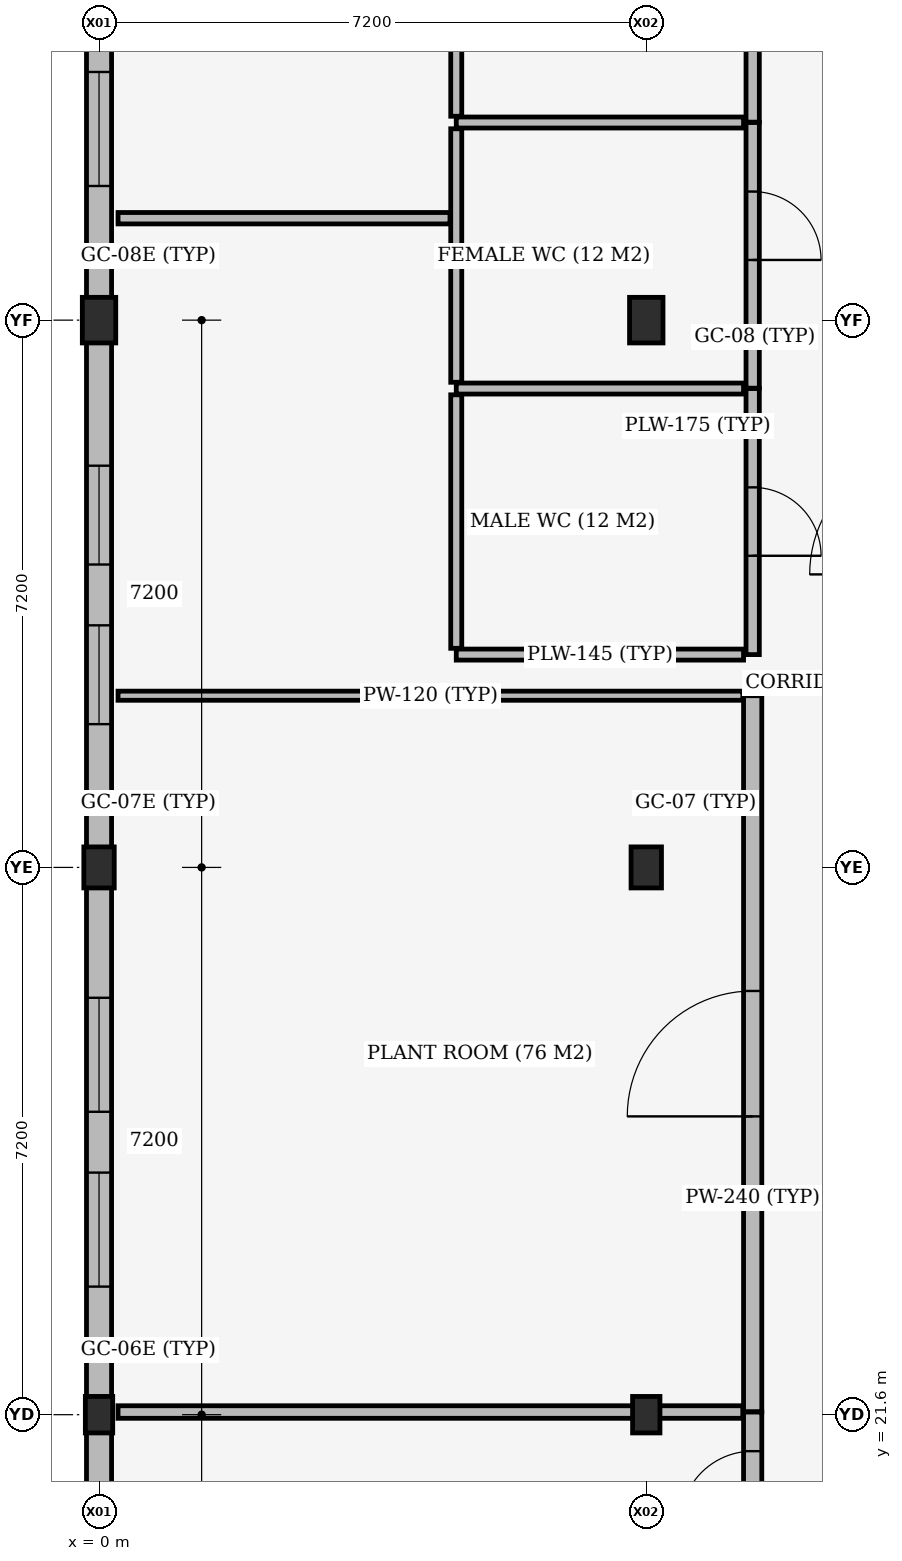
"""IFC4 building model, lengths in metres.
Left out: names, types, materials, properties, quantities, classifications, styles, units other than length and angle.
Written with IfcOpenShell. Run it as: python <this file> out.ifc"""

import sys

from ifc_helpers import new_model, si_unit, direction, frame, frame_2d, origin, origin_2d, place, context, subcontext, project, spatial, rectangle, extrude, element, fill, save


model = new_model("IFC4")
c1 = context("Model", 3, precision=1e-05, world=origin(), true_north=direction((0.0, 1.0)))
c2 = subcontext(c1, "Body", "Model", "MODEL_VIEW")
j1 = project(units=[si_unit("LENGTHUNIT", "METRE"), si_unit("PLANEANGLEUNIT", "RADIAN")], contexts=[c1])
p1 = place(None, origin())
s1 = spatial("IfcSite", under=j1, at=p1, CompositionType="ELEMENT")
p2 = place(p1, origin())
s2 = spatial("IfcBuilding", under=s1, at=p2, CompositionType="ELEMENT")
p3 = place(p2, frame((0.0, 0.0, 22.2)))
s3 = spatial("IfcBuildingStorey", under=s2, at=p3, CompositionType="ELEMENT", Elevation=22.2)
p4 = place(p3, frame((0.0, 21.6, 0.0), z_axis=(0.0, 0.0, 1.0), x_axis=(1.0, 0.0, 0.0)))
e1 = element("IfcColumn", 1, at=p4, inside=s3, PredefinedType="COLUMN", context=c2, shape_type="SweptSolid", body=[
    extrude(rectangle(XDim=0.36, YDim=0.48, at=origin_2d()), origin(), (0.0, 0.0, 1.0), 3.96),
])
p5 = place(p3, frame((0.0, 28.8, 0.0), z_axis=(0.0, 0.0, 1.0), x_axis=(1.0, 0.0, 0.0)))
e2 = element("IfcColumn", 2, at=p5, inside=s3, PredefinedType="COLUMN", context=c2, shape_type="SweptSolid", body=[
    extrude(rectangle(XDim=0.4, YDim=0.54, at=origin_2d()), origin(), (0.0, 0.0, 1.0), 3.96),
])
p6 = place(p3, frame((0.0, 36.0, 0.0), z_axis=(0.0, 0.0, 1.0), x_axis=(1.0, 0.0, 0.0)))
e3 = element("IfcColumn", 3, at=p6, inside=s3, PredefinedType="COLUMN", context=c2, shape_type="SweptSolid", body=[
    extrude(rectangle(XDim=0.44, YDim=0.6, at=origin_2d()), origin(), (0.0, 0.0, 1.0), 3.96),
])
p7 = place(p3, frame((7.2, 21.6, 0.0), z_axis=(0.0, 0.0, 1.0), x_axis=(1.0, 0.0, 0.0)))
e4 = element("IfcColumn", 4, at=p7, inside=s3, PredefinedType="COLUMN", context=c2, shape_type="SweptSolid", body=[
    extrude(rectangle(XDim=0.36, YDim=0.48, at=origin_2d()), origin(), (0.0, 0.0, 1.0), 3.96),
])
p8 = place(p3, frame((7.2, 28.8, 0.0), z_axis=(0.0, 0.0, 1.0), x_axis=(1.0, 0.0, 0.0)))
e5 = element("IfcColumn", 5, at=p8, inside=s3, PredefinedType="COLUMN", context=c2, shape_type="SweptSolid", body=[
    extrude(rectangle(XDim=0.4, YDim=0.54, at=origin_2d()), origin(), (0.0, 0.0, 1.0), 3.96),
])
p9 = place(p3, frame((7.2, 36.0, 0.0), z_axis=(0.0, 0.0, 1.0), x_axis=(1.0, 0.0, 0.0)))
e6 = element("IfcColumn", 6, at=p9, inside=s3, PredefinedType="COLUMN", context=c2, shape_type="SweptSolid", body=[
    extrude(rectangle(XDim=0.44, YDim=0.6, at=origin_2d()), origin(), (0.0, 0.0, 1.0), 3.96),
])
p10 = place(p3, frame((0.0, 14.642, 0.0), z_axis=(0.0, 0.0, 1.0), x_axis=(0.0, 1.0, 0.0)))
e7 = element("IfcWall", 7, at=p10, inside=s3, PredefinedType="STANDARD", context=c2, shape_type="SweptSolid", body=[
    extrude(rectangle(XDim=6.726, YDim=0.33, at=frame_2d((3.363, 0.0))), origin(), (0.0, 0.0, 1.0), 3.96),
])
p11 = place(p10, frame((1.663, 0.0, 0.95)))
e8 = element("IfcOpeningElement", 8, at=p11, cuts=e7, PredefinedType="OPENING", context=c2, shape_type="SweptSolid", body=[
    extrude(rectangle(XDim=1.3, YDim=1.8, at=frame_2d((0.65, 0.9))), frame((0.0, 0.175, 0.0), z_axis=(0.0, -1.0, 0.0), x_axis=(1.0, 0.0, 0.0)), (0.0, 0.0, 1.0), 0.35),
])
p12 = place(p10, frame((3.763, 0.0, 0.95)))
e9 = element("IfcOpeningElement", 9, at=p12, cuts=e7, PredefinedType="OPENING", context=c2, shape_type="SweptSolid", body=[
    extrude(rectangle(XDim=1.3, YDim=1.8, at=frame_2d((0.65, 0.9))), frame((0.0, 0.175, 0.0), z_axis=(0.0, -1.0, 0.0), x_axis=(1.0, 0.0, 0.0)), (0.0, 0.0, 1.0), 0.35),
])
p13 = place(p3, frame((0.0, 21.832, 0.0), z_axis=(0.0, 0.0, 1.0), x_axis=(0.0, 1.0, 0.0)))
e10 = element("IfcWall", 10, at=p13, inside=s3, PredefinedType="STANDARD", context=c2, shape_type="SweptSolid", body=[
    extrude(rectangle(XDim=6.706, YDim=0.33, at=frame_2d((3.353, 0.0))), origin(), (0.0, 0.0, 1.0), 3.96),
])
p14 = place(p13, frame((1.453, 0.0, 0.95)))
e11 = element("IfcOpeningElement", 11, at=p14, cuts=e10, PredefinedType="OPENING", context=c2, shape_type="SweptSolid", body=[
    extrude(rectangle(XDim=1.5, YDim=1.8, at=frame_2d((0.75, 0.9))), frame((0.0, 0.175, 0.0), z_axis=(0.0, -1.0, 0.0), x_axis=(1.0, 0.0, 0.0)), (0.0, 0.0, 1.0), 0.35),
])
p15 = place(p13, frame((3.753, 0.0, 0.95)))
e12 = element("IfcOpeningElement", 12, at=p15, cuts=e10, PredefinedType="OPENING", context=c2, shape_type="SweptSolid", body=[
    extrude(rectangle(XDim=1.5, YDim=1.8, at=frame_2d((0.75, 0.9))), frame((0.0, 0.175, 0.0), z_axis=(0.0, -1.0, 0.0), x_axis=(1.0, 0.0, 0.0)), (0.0, 0.0, 1.0), 0.35),
])
p16 = place(p3, frame((0.0, 29.062, 0.0), z_axis=(0.0, 0.0, 1.0), x_axis=(0.0, 1.0, 0.0)))
e13 = element("IfcWall", 13, at=p16, inside=s3, PredefinedType="STANDARD", context=c2, shape_type="SweptSolid", body=[
    extrude(rectangle(XDim=6.646, YDim=0.33, at=frame_2d((3.323, 0.0))), origin(), (0.0, 0.0, 1.0), 3.96),
])
p17 = place(p16, frame((1.623, 0.0, 0.95)))
e14 = element("IfcOpeningElement", 14, at=p17, cuts=e13, PredefinedType="OPENING", context=c2, shape_type="SweptSolid", body=[
    extrude(rectangle(XDim=1.3, YDim=1.8, at=frame_2d((0.65, 0.9))), frame((0.0, 0.175, 0.0), z_axis=(0.0, -1.0, 0.0), x_axis=(1.0, 0.0, 0.0)), (0.0, 0.0, 1.0), 0.35),
])
p18 = place(p16, frame((3.723, 0.0, 0.95)))
e15 = element("IfcOpeningElement", 15, at=p18, cuts=e13, PredefinedType="OPENING", context=c2, shape_type="SweptSolid", body=[
    extrude(rectangle(XDim=1.3, YDim=1.8, at=frame_2d((0.65, 0.9))), frame((0.0, 0.175, 0.0), z_axis=(0.0, -1.0, 0.0), x_axis=(1.0, 0.0, 0.0)), (0.0, 0.0, 1.0), 0.35),
])
p19 = place(p3, frame((0.0, 36.292, 0.0), z_axis=(0.0, 0.0, 1.0), x_axis=(0.0, 1.0, 0.0)))
e16 = element("IfcWall", 16, at=p19, inside=s3, PredefinedType="STANDARD", context=c2, shape_type="SweptSolid", body=[
    extrude(rectangle(XDim=6.746, YDim=0.33, at=frame_2d((3.373, 0.0))), origin(), (0.0, 0.0, 1.0), 3.96),
])
p20 = place(p19, frame((1.473, 0.0, 0.95)))
e17 = element("IfcOpeningElement", 17, at=p20, cuts=e16, PredefinedType="OPENING", context=c2, shape_type="SweptSolid", body=[
    extrude(rectangle(XDim=1.5, YDim=1.8, at=frame_2d((0.75, 0.9))), frame((0.0, 0.175, 0.0), z_axis=(0.0, -1.0, 0.0), x_axis=(1.0, 0.0, 0.0)), (0.0, 0.0, 1.0), 0.35),
])
p21 = place(p19, frame((3.773, 0.0, 0.95)))
e18 = element("IfcOpeningElement", 18, at=p21, cuts=e16, PredefinedType="OPENING", context=c2, shape_type="SweptSolid", body=[
    extrude(rectangle(XDim=1.5, YDim=1.8, at=frame_2d((0.75, 0.9))), frame((0.0, 0.175, 0.0), z_axis=(0.0, -1.0, 0.0), x_axis=(1.0, 0.0, 0.0)), (0.0, 0.0, 1.0), 0.35),
])
p22 = place(p3, frame((8.6, 31.6, 0.0), z_axis=(0.0, 0.0, 1.0), x_axis=(0.0, 1.0, 0.0)))
e19 = element("IfcWall", 19, at=p22, inside=s3, PredefinedType="PLUMBINGWALL", context=c2, shape_type="SweptSolid", body=[
    extrude(rectangle(XDim=3.5, YDim=0.175, at=frame_2d((1.75, 0.0))), origin(), (0.0, 0.0, 1.0), 3.96),
])
p23 = place(p22, frame((1.3, 0.0, 0.0)))
e20 = element("IfcOpeningElement", 20, at=p23, cuts=e19, PredefinedType="OPENING", context=c2, shape_type="SweptSolid", body=[
    extrude(rectangle(XDim=0.9, YDim=2.1, at=frame_2d((0.45, 1.05))), frame((0.0, 0.097, 0.0), z_axis=(0.0, -1.0, 0.0), x_axis=(1.0, 0.0, 0.0)), (0.0, 0.0, 1.0), 0.195),
])
for number, where, z_axis, x_axis in (
    (21, (4.7, 31.6, 0.0), (0.0, 0.0, 1.0), (1.0, 0.0, 0.0)),
    (22, (4.7, 35.1, 0.0), (0.0, 0.0, 1.0), (1.0, 0.0, 0.0)),
):
    element("IfcWall", number, at=place(p3, frame(where, z_axis=z_axis, x_axis=x_axis)), inside=s3, PredefinedType="PLUMBINGWALL", context=c2, shape_type="SweptSolid", body=[
        extrude(rectangle(XDim=3.78, YDim=0.145, at=frame_2d((1.89, 0.0))), origin(), (0.0, 0.0, 1.0), 3.96),
    ])
p24 = place(p3, frame((4.7, 31.683, 0.0), z_axis=(0.0, 0.0, 1.0), x_axis=(0.0, 1.0, 0.0)))
e23 = element("IfcWall", 23, at=p24, inside=s3, PredefinedType="PLUMBINGWALL", context=c2, shape_type="SweptSolid", body=[
    extrude(rectangle(XDim=3.335, YDim=0.145, at=frame_2d((1.667, 0.0))), origin(), (0.0, 0.0, 1.0), 3.96),
])
p25 = place(p3, frame((8.6, 35.105, 0.0), z_axis=(0.0, 0.0, 1.0), x_axis=(0.0, 1.0, 0.0)))
e24 = element("IfcWall", 24, at=p25, inside=s3, PredefinedType="PLUMBINGWALL", context=c2, shape_type="SweptSolid", body=[
    extrude(rectangle(XDim=3.495, YDim=0.175, at=frame_2d((1.748, 0.0))), origin(), (0.0, 0.0, 1.0), 3.96),
])
p26 = place(p25, frame((1.687, 0.0, 0.0)))
e25 = element("IfcOpeningElement", 25, at=p26, cuts=e24, PredefinedType="OPENING", context=c2, shape_type="SweptSolid", body=[
    extrude(rectangle(XDim=0.9, YDim=2.1, at=frame_2d((0.45, 1.05))), frame((0.0, 0.097, 0.0), z_axis=(0.0, -1.0, 0.0), x_axis=(1.0, 0.0, 0.0)), (0.0, 0.0, 1.0), 0.195),
])
p27 = place(p3, frame((4.7, 38.6, 0.0), z_axis=(0.0, 0.0, 1.0), x_axis=(1.0, 0.0, 0.0)))
e26 = element("IfcWall", 26, at=p27, inside=s3, PredefinedType="PLUMBINGWALL", context=c2, shape_type="SweptSolid", body=[
    extrude(rectangle(XDim=3.78, YDim=0.145, at=frame_2d((1.89, 0.0))), origin(), (0.0, 0.0, 1.0), 3.96),
])
p28 = place(p3, frame((4.7, 35.183, 0.0), z_axis=(0.0, 0.0, 1.0), x_axis=(0.0, 1.0, 0.0)))
e27 = element("IfcWall", 27, at=p28, inside=s3, PredefinedType="PLUMBINGWALL", context=c2, shape_type="SweptSolid", body=[
    extrude(rectangle(XDim=3.335, YDim=0.145, at=frame_2d((1.667, 0.0))), origin(), (0.0, 0.0, 1.0), 3.96),
])
p29 = place(p3, frame((8.6, 38.605, 0.0), z_axis=(0.0, 0.0, 1.0), x_axis=(0.0, 1.0, 0.0)))
e28 = element("IfcWall", 28, at=p29, inside=s3, PredefinedType="PLUMBINGWALL", context=c2, shape_type="SweptSolid", body=[
    extrude(rectangle(XDim=2.995, YDim=0.175, at=frame_2d((1.498, 0.0))), origin(), (0.0, 0.0, 1.0), 3.96),
])
p30 = place(p29, frame((1.038, 0.0, 0.0)))
e29 = element("IfcOpeningElement", 29, at=p30, cuts=e28, PredefinedType="OPENING", context=c2, shape_type="SweptSolid", body=[
    extrude(rectangle(XDim=0.92, YDim=2.1, at=frame_2d((0.46, 1.05))), frame((0.0, 0.097, 0.0), z_axis=(0.0, -1.0, 0.0), x_axis=(1.0, 0.0, 0.0)), (0.0, 0.0, 1.0), 0.195),
])
p31 = place(p3, frame((4.7, 38.683, 0.0), z_axis=(0.0, 0.0, 1.0), x_axis=(0.0, 1.0, 0.0)))
e30 = element("IfcWall", 30, at=p31, inside=s3, PredefinedType="PLUMBINGWALL", context=c2, shape_type="SweptSolid", body=[
    extrude(rectangle(XDim=2.835, YDim=0.145, at=frame_2d((1.417, 0.0))), origin(), (0.0, 0.0, 1.0), 3.96),
])
p32 = place(p3, frame((8.6, 19.655, 0.0), z_axis=(0.0, 0.0, 1.0), x_axis=(0.0, 1.0, 0.0)))
e31 = element("IfcWall", 31, at=p32, inside=s3, PredefinedType="STANDARD", context=c2, shape_type="SweptSolid", body=[
    extrude(rectangle(XDim=1.98, YDim=0.24, at=frame_2d((0.99, 0.0))), origin(), (0.0, 0.0, 1.0), 3.96),
])
p33 = place(p32, frame((0.515, 0.0, 0.0)))
e32 = element("IfcOpeningElement", 32, at=p33, cuts=e31, PredefinedType="OPENING", context=c2, shape_type="SweptSolid", body=[
    extrude(rectangle(XDim=0.95, YDim=2.15, at=frame_2d((0.475, 1.075))), frame((0.0, 0.13, 0.0), z_axis=(0.0, -1.0, 0.0), x_axis=(1.0, 0.0, 0.0)), (0.0, 0.0, 1.0), 0.26),
])
p34 = place(p3, frame((0.25, 21.635, 0.0), z_axis=(0.0, 0.0, 1.0), x_axis=(1.0, 0.0, 0.0)))
e33 = element("IfcWall", 33, at=p34, inside=s3, PredefinedType="PARTITIONING", context=c2, shape_type="SweptSolid", body=[
    extrude(rectangle(XDim=8.22, YDim=0.165, at=frame_2d((4.11, 0.0))), origin(), (0.0, 0.0, 1.0), 3.96),
])
p35 = place(p3, frame((8.6, 21.64, 0.0), z_axis=(0.0, 0.0, 1.0), x_axis=(0.0, 1.0, 0.0)))
e34 = element("IfcWall", 34, at=p35, inside=s3, PredefinedType="STANDARD", context=c2, shape_type="SweptSolid", body=[
    extrude(rectangle(XDim=9.419, YDim=0.24, at=frame_2d((4.709, 0.0))), origin(), (0.0, 0.0, 1.0), 3.96),
])
p36 = place(p35, frame((3.885, 0.0, 0.0)))
e35 = element("IfcOpeningElement", 35, at=p36, cuts=e34, PredefinedType="OPENING", context=c2, shape_type="SweptSolid", body=[
    extrude(rectangle(XDim=1.65, YDim=2.25, at=frame_2d((0.825, 1.125))), frame((0.0, 0.13, 0.0), z_axis=(0.0, -1.0, 0.0), x_axis=(1.0, 0.0, 0.0)), (0.0, 0.0, 1.0), 0.26),
])
p37 = place(p3, frame((0.25, 31.059, 0.0), z_axis=(0.0, 0.0, 1.0), x_axis=(1.0, 0.0, 0.0)))
e36 = element("IfcWall", 36, at=p37, inside=s3, PredefinedType="PARTITIONING", context=c2, shape_type="SweptSolid", body=[
    extrude(rectangle(XDim=8.22, YDim=0.12, at=frame_2d((4.11, 0.0))), origin(), (0.0, 0.0, 1.0), 3.96),
])
p38 = place(p3, frame((0.25, 37.341, 0.0), z_axis=(0.0, 0.0, 1.0), x_axis=(1.0, 0.0, 0.0)))
e37 = element("IfcWall", 37, at=p38, inside=s3, PredefinedType="PARTITIONING", context=c2, shape_type="SweptSolid", body=[
    extrude(rectangle(XDim=4.367, YDim=0.15, at=frame_2d((2.184, 0.0))), origin(), (0.0, 0.0, 1.0), 3.96),
])
p39 = place(p14, origin())
e38 = element("IfcWindow", 38, at=p39, inside=s3, PartitioningType="DOUBLE_PANEL_VERTICAL", PredefinedType="WINDOW", context=c2, shape_type="SweptSolid", body=[
    extrude(rectangle(XDim=1.5, YDim=1.8, at=frame_2d((0.75, 0.9))), frame((0.0, 0.03, 0.0), z_axis=(0.0, -1.0, 0.0), x_axis=(1.0, 0.0, 0.0)), (0.0, 0.0, 1.0), 0.06),
])
fill(e11, e38)
p40 = place(p15, origin())
e39 = element("IfcWindow", 39, at=p40, inside=s3, PartitioningType="DOUBLE_PANEL_VERTICAL", PredefinedType="WINDOW", context=c2, shape_type="SweptSolid", body=[
    extrude(rectangle(XDim=1.5, YDim=1.8, at=frame_2d((0.75, 0.9))), frame((0.0, 0.03, 0.0), z_axis=(0.0, -1.0, 0.0), x_axis=(1.0, 0.0, 0.0)), (0.0, 0.0, 1.0), 0.06),
])
fill(e12, e39)
p41 = place(p17, origin())
e40 = element("IfcWindow", 40, at=p41, inside=s3, PartitioningType="DOUBLE_PANEL_VERTICAL", PredefinedType="WINDOW", context=c2, shape_type="SweptSolid", body=[
    extrude(rectangle(XDim=1.3, YDim=1.8, at=frame_2d((0.65, 0.9))), frame((0.0, 0.03, 0.0), z_axis=(0.0, -1.0, 0.0), x_axis=(1.0, 0.0, 0.0)), (0.0, 0.0, 1.0), 0.06),
])
fill(e14, e40)
p42 = place(p18, origin())
e41 = element("IfcWindow", 41, at=p42, inside=s3, PartitioningType="DOUBLE_PANEL_VERTICAL", PredefinedType="WINDOW", context=c2, shape_type="SweptSolid", body=[
    extrude(rectangle(XDim=1.3, YDim=1.8, at=frame_2d((0.65, 0.9))), frame((0.0, 0.03, 0.0), z_axis=(0.0, -1.0, 0.0), x_axis=(1.0, 0.0, 0.0)), (0.0, 0.0, 1.0), 0.06),
])
fill(e15, e41)
p43 = place(p20, origin())
e42 = element("IfcWindow", 42, at=p43, inside=s3, PartitioningType="DOUBLE_PANEL_VERTICAL", PredefinedType="WINDOW", context=c2, shape_type="SweptSolid", body=[
    extrude(rectangle(XDim=1.5, YDim=1.8, at=frame_2d((0.75, 0.9))), frame((0.0, 0.03, 0.0), z_axis=(0.0, -1.0, 0.0), x_axis=(1.0, 0.0, 0.0)), (0.0, 0.0, 1.0), 0.06),
])
fill(e17, e42)
p44 = place(p23, origin())
e43 = element("IfcDoor", 43, at=p44, inside=s3, OperationType="SINGLE_SWING_RIGHT", PredefinedType="DOOR", context=c2, shape_type="SweptSolid", body=[
    extrude(rectangle(XDim=0.9, YDim=2.1, at=frame_2d((0.45, 1.05))), frame((0.0, 0.025, 0.0), z_axis=(0.0, -1.0, 0.0), x_axis=(1.0, 0.0, 0.0)), (0.0, 0.0, 1.0), 0.05),
])
fill(e20, e43)
p45 = place(p26, origin())
e44 = element("IfcDoor", 44, at=p45, inside=s3, OperationType="SINGLE_SWING_RIGHT", PredefinedType="DOOR", context=c2, shape_type="SweptSolid", body=[
    extrude(rectangle(XDim=0.9, YDim=2.1, at=frame_2d((0.45, 1.05))), frame((0.0, 0.025, 0.0), z_axis=(0.0, -1.0, 0.0), x_axis=(1.0, 0.0, 0.0)), (0.0, 0.0, 1.0), 0.05),
])
fill(e25, e44)
p46 = place(p33, origin())
e45 = element("IfcDoor", 45, at=p46, inside=s3, OperationType="SINGLE_SWING_LEFT", PredefinedType="DOOR", context=c2, shape_type="SweptSolid", body=[
    extrude(rectangle(XDim=0.95, YDim=2.15, at=frame_2d((0.475, 1.075))), frame((0.0, 0.025, 0.0), z_axis=(0.0, -1.0, 0.0), x_axis=(1.0, 0.0, 0.0)), (0.0, 0.0, 1.0), 0.05),
])
fill(e32, e45)
p47 = place(p36, origin())
e46 = element("IfcDoor", 46, at=p47, inside=s3, OperationType="DOUBLE_DOOR_SINGLE_SWING", PredefinedType="DOOR", context=c2, shape_type="SweptSolid", body=[
    extrude(rectangle(XDim=1.65, YDim=2.25, at=frame_2d((0.825, 1.125))), frame((0.0, 0.025, 0.0), z_axis=(0.0, -1.0, 0.0), x_axis=(1.0, 0.0, 0.0)), (0.0, 0.0, 1.0), 0.05),
])
fill(e35, e46)
save(model, sys.argv[1])
